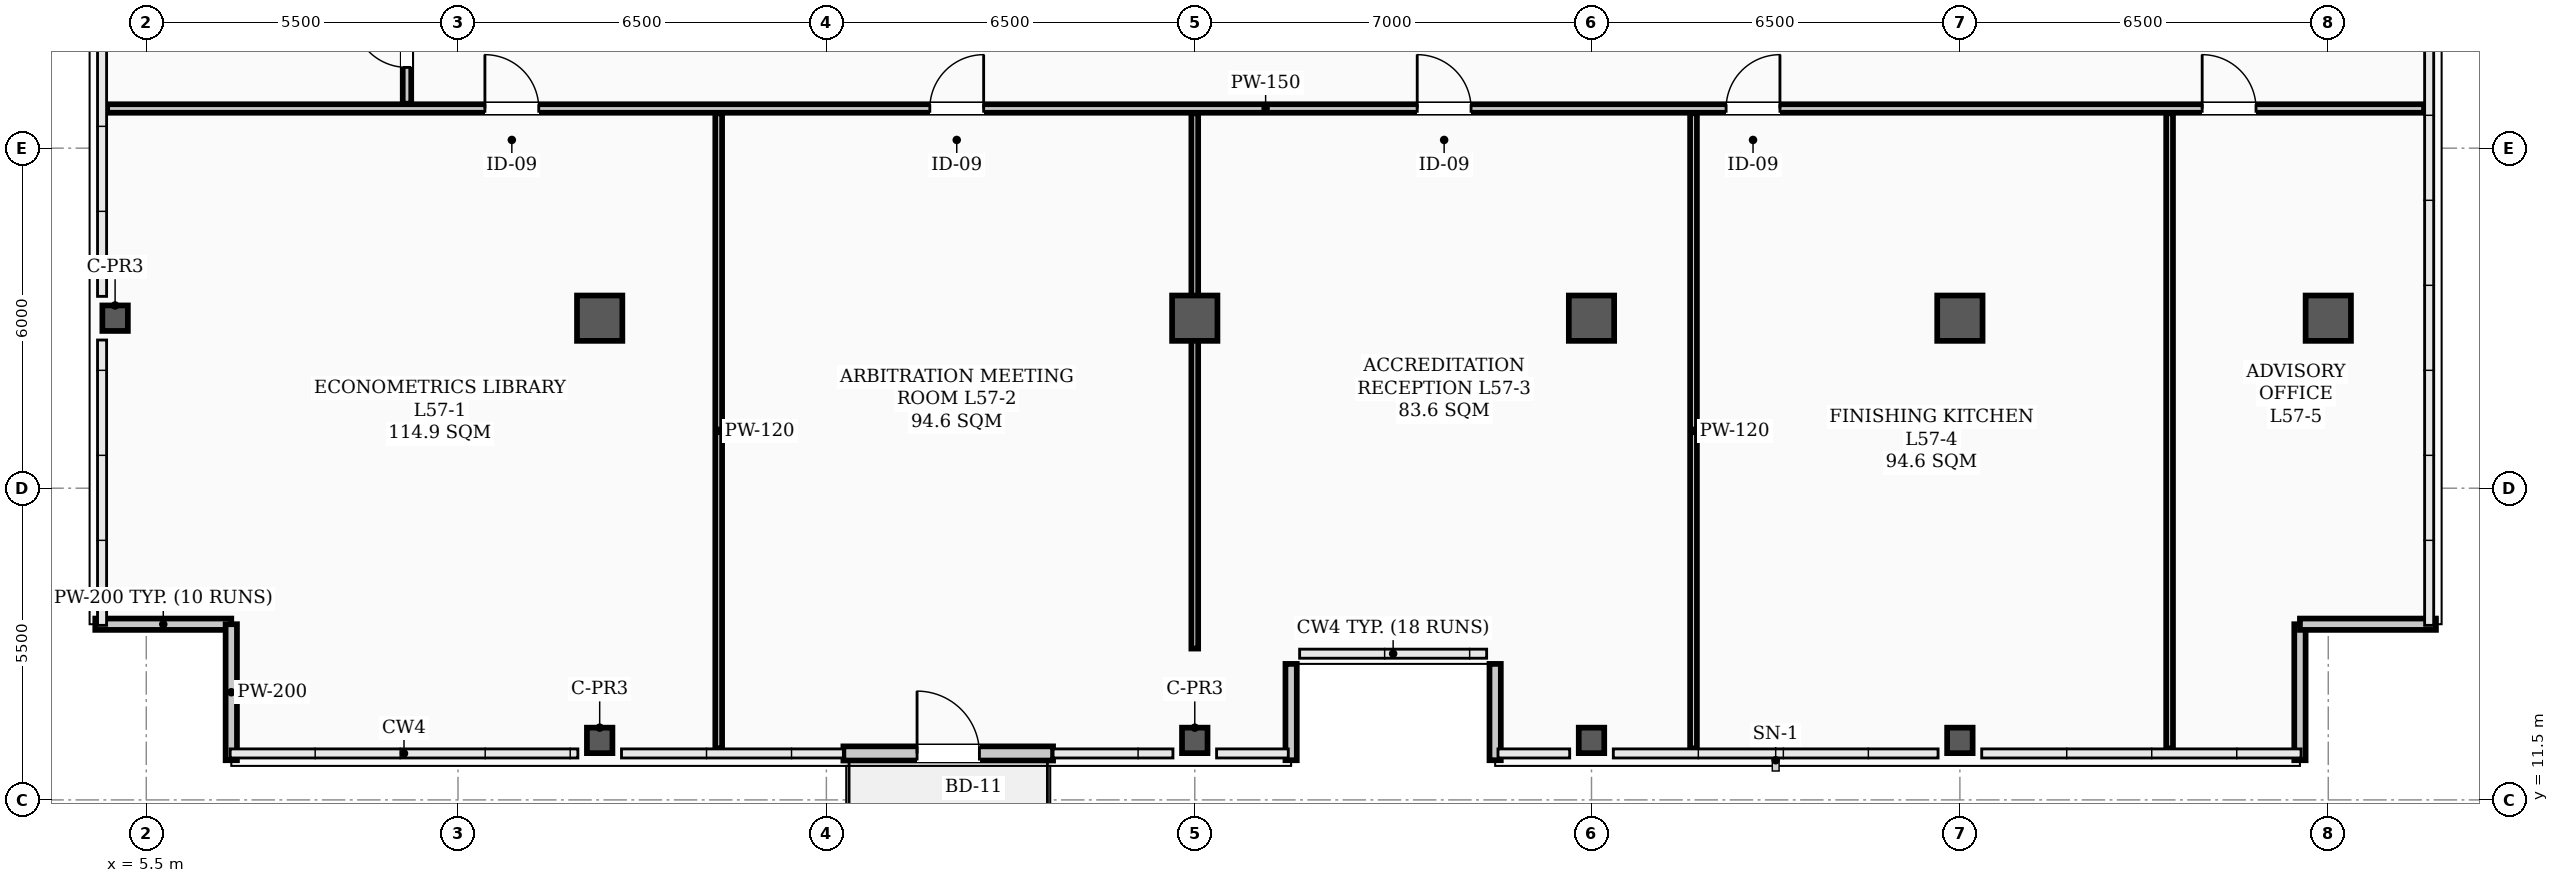
"""IFC4 building model, lengths in metres.
Left out: names, types, materials, properties, quantities, classifications, styles, units other than length and angle.
Written with IfcOpenShell. Run it as: python <this file> out.ifc"""

import sys

from ifc_helpers import new_model, si_unit, direction, frame, frame_2d, origin, origin_2d, place, context, subcontext, project, spatial, rectangle, hollow_rectangle, extrude, element, fill, save


model = new_model("IFC4")
c1 = context("Model", 3, precision=1e-05, world=origin(), true_north=direction((0.0, 1.0)))
c2 = subcontext(c1, "Body", "Model", "MODEL_VIEW")
j1 = project(units=[si_unit("LENGTHUNIT", "METRE"), si_unit("PLANEANGLEUNIT", "RADIAN")], contexts=[c1])
p1 = place(None, origin())
s1 = spatial("IfcSite", under=j1, at=p1, CompositionType="ELEMENT")
p2 = place(p1, origin())
s2 = spatial("IfcBuilding", under=s1, at=p2, CompositionType="ELEMENT")
p3 = place(p2, frame((0.0, 0.0, 230.6)))
s3 = spatial("IfcBuildingStorey", under=s2, at=p3, CompositionType="ELEMENT", Elevation=230.6)
for number, where, z_axis, x_axis in (
    (1, (13.5, 20.0, 0.0), (0.0, 0.0, 1.0), (1.0, 0.0, 0.0)),
    (2, (24.0, 20.0, 0.0), (0.0, 0.0, 1.0), (1.0, 0.0, 0.0)),
    (3, (31.0, 20.0, 0.0), (0.0, 0.0, 1.0), (1.0, 0.0, 0.0)),
    (4, (37.5, 20.0, 0.0), (0.0, 0.0, 1.0), (1.0, 0.0, 0.0)),
    (5, (44.0, 20.0, 0.0), (0.0, 0.0, 1.0), (1.0, 0.0, 0.0)),
):
    element("IfcColumn", number, at=place(p3, frame(where, z_axis=z_axis, x_axis=x_axis)), inside=s3, PredefinedType="COLUMN", context=c2, shape_type="SweptSolid", body=[
        extrude(hollow_rectangle(XDim=0.8, YDim=0.8, WallThickness=0.032, InnerFilletRadius=0.016, OuterFilletRadius=0.048, at=origin_2d()), origin(), (0.0, 0.0, 1.0), 3.9),
    ])
for number, where, z_axis, x_axis in (
    (6, (4.95, 20.0, 0.0), (0.0, 0.0, 1.0), (1.0, 0.0, 0.0)),
    (7, (13.5, 12.55, 0.0), (0.0, 0.0, 1.0), (1.0, 0.0, 0.0)),
    (8, (24.0, 12.55, 0.0), (0.0, 0.0, 1.0), (1.0, 0.0, 0.0)),
    (9, (31.0, 12.55, 0.0), (0.0, 0.0, 1.0), (1.0, 0.0, 0.0)),
    (10, (37.5, 12.55, 0.0), (0.0, 0.0, 1.0), (1.0, 0.0, 0.0)),
):
    element("IfcColumn", number, at=place(p3, frame(where, z_axis=z_axis, x_axis=x_axis)), inside=s3, PredefinedType="COLUMN", context=c2, shape_type="SweptSolid", body=[
        extrude(hollow_rectangle(XDim=0.45, YDim=0.45, WallThickness=0.022, InnerFilletRadius=0.022, OuterFilletRadius=0.044, at=origin_2d()), origin(), (0.0, 0.0, 1.0), 3.9),
    ])
p4 = place(p3, frame((4.6, 14.6, 0.0), z_axis=(0.0, 0.0, 1.0), x_axis=(1.0, 0.0, 0.0)))
e11 = element("IfcWall", 11, at=p4, inside=s3, PredefinedType="PARAPET", context=c2, shape_type="SweptSolid", body=[
    extrude(rectangle(XDim=2.4, YDim=0.2, at=frame_2d((1.2, 0.0))), origin(), (0.0, 0.0, 1.0), 1.2),
])
for number, where, z_axis, x_axis in (
    (12, (7.0, 14.6, 0.0), (0.0, 0.0, 1.0), (0.0, -1.0, 0.0)),
    (13, (43.5, 12.2, 0.0), (0.0, 0.0, 1.0), (0.0, 1.0, 0.0)),
):
    element("IfcWall", number, at=place(p3, frame(where, z_axis=z_axis, x_axis=x_axis)), inside=s3, PredefinedType="PARAPET", context=c2, shape_type="SweptSolid", body=[
        extrude(rectangle(XDim=2.4, YDim=0.2, at=frame_2d((1.2, 0.0))), origin(), (0.0, 0.0, 1.0), 1.2),
    ])
p5 = place(p3, frame((43.5, 14.6, 0.0), z_axis=(0.0, 0.0, 1.0), x_axis=(1.0, 0.0, 0.0)))
e14 = element("IfcWall", 14, at=p5, inside=s3, PredefinedType="PARAPET", context=c2, shape_type="SweptSolid", body=[
    extrude(rectangle(XDim=2.4, YDim=0.2, at=frame_2d((1.2, 0.0))), origin(), (0.0, 0.0, 1.0), 1.2),
])
for number, where, z_axis, x_axis in (
    (15, (25.7, 12.2, 0.0), (0.0, 0.0, 1.0), (0.0, 1.0, 0.0)),
    (16, (29.3, 13.9, 0.0), (0.0, 0.0, 1.0), (0.0, -1.0, 0.0)),
):
    element("IfcWall", number, at=place(p3, frame(where, z_axis=z_axis, x_axis=x_axis)), inside=s3, PredefinedType="PARAPET", context=c2, shape_type="SweptSolid", body=[
        extrude(rectangle(XDim=1.7, YDim=0.2, at=frame_2d((0.85, 0.0))), origin(), (0.0, 0.0, 1.0), 1.2),
    ])
p6 = place(p3, frame((17.8, 12.32, 0.0), z_axis=(0.0, 0.0, 1.0), x_axis=(1.0, 0.0, 0.0)))
e17 = element("IfcWall", 17, at=p6, inside=s3, PredefinedType="STANDARD", context=c2, shape_type="SweptSolid", body=[
    extrude(rectangle(XDim=3.7, YDim=0.25, at=frame_2d((1.85, 0.0))), origin(), (0.0, 0.0, 1.0), 3.18),
])
p7 = place(p6, frame((1.3, 0.0, 0.0)))
e18 = element("IfcOpeningElement", 18, at=p7, cuts=e17, PredefinedType="OPENING", context=c2, shape_type="SweptSolid", body=[
    extrude(rectangle(XDim=1.1, YDim=2.2, at=frame_2d((0.55, 1.1))), frame((0.0, 0.135, 0.0), z_axis=(0.0, -1.0, 0.0), x_axis=(1.0, 0.0, 0.0)), (0.0, 0.0, 1.0), 0.27),
])
p8 = place(p3, frame((4.81, 23.7, 0.0), z_axis=(0.0, 0.0, 1.0), x_axis=(1.0, 0.0, 0.0)))
e19 = element("IfcWall", 19, at=p8, inside=s3, PredefinedType="PARTITIONING", context=c2, shape_type="SweptSolid", body=[
    extrude(rectangle(XDim=40.88, YDim=0.15, at=frame_2d((20.44, 0.0))), origin(), (0.0, 0.0, 1.0), 3.2),
])
p9 = place(p8, frame((6.665, 0.0, 0.0)))
e20 = element("IfcOpeningElement", 20, at=p9, cuts=e19, PredefinedType="OPENING", context=c2, shape_type="SweptSolid", body=[
    extrude(rectangle(XDim=0.95, YDim=2.08, at=frame_2d((0.475, 1.04))), frame((0.0, 0.085, 0.0), z_axis=(0.0, -1.0, 0.0), x_axis=(1.0, 0.0, 0.0)), (0.0, 0.0, 1.0), 0.17),
])
p10 = place(p8, frame((14.515, 0.0, 0.0)))
e21 = element("IfcOpeningElement", 21, at=p10, cuts=e19, PredefinedType="OPENING", context=c2, shape_type="SweptSolid", body=[
    extrude(rectangle(XDim=0.95, YDim=2.08, at=frame_2d((0.475, 1.04))), frame((0.0, 0.085, 0.0), z_axis=(0.0, -1.0, 0.0), x_axis=(1.0, 0.0, 0.0)), (0.0, 0.0, 1.0), 0.17),
])
p11 = place(p8, frame((23.115, 0.0, 0.0)))
e22 = element("IfcOpeningElement", 22, at=p11, cuts=e19, PredefinedType="OPENING", context=c2, shape_type="SweptSolid", body=[
    extrude(rectangle(XDim=0.95, YDim=2.08, at=frame_2d((0.475, 1.04))), frame((0.0, 0.085, 0.0), z_axis=(0.0, -1.0, 0.0), x_axis=(1.0, 0.0, 0.0)), (0.0, 0.0, 1.0), 0.17),
])
p12 = place(p8, frame((28.565, 0.0, 0.0)))
e23 = element("IfcOpeningElement", 23, at=p12, cuts=e19, PredefinedType="OPENING", context=c2, shape_type="SweptSolid", body=[
    extrude(rectangle(XDim=0.95, YDim=2.08, at=frame_2d((0.475, 1.04))), frame((0.0, 0.085, 0.0), z_axis=(0.0, -1.0, 0.0), x_axis=(1.0, 0.0, 0.0)), (0.0, 0.0, 1.0), 0.17),
])
p13 = place(p8, frame((36.965, 0.0, 0.0)))
e24 = element("IfcOpeningElement", 24, at=p13, cuts=e19, PredefinedType="OPENING", context=c2, shape_type="SweptSolid", body=[
    extrude(rectangle(XDim=0.95, YDim=2.08, at=frame_2d((0.475, 1.04))), frame((0.0, 0.085, 0.0), z_axis=(0.0, -1.0, 0.0), x_axis=(1.0, 0.0, 0.0)), (0.0, 0.0, 1.0), 0.17),
])
p14 = place(p3, frame((10.1, 23.785, 0.0), z_axis=(0.0, 0.0, 1.0), x_axis=(0.0, 1.0, 0.0)))
e25 = element("IfcWall", 25, at=p14, inside=s3, PredefinedType="PARTITIONING", context=c2, shape_type="SweptSolid", body=[
    extrude(rectangle(XDim=12.28, YDim=0.15, at=frame_2d((6.14, 0.0))), origin(), (0.0, 0.0, 1.0), 3.1),
])
p15 = place(p14, frame((0.64, 0.0, 0.0)))
e26 = element("IfcOpeningElement", 26, at=p15, cuts=e25, PredefinedType="OPENING", context=c2, shape_type="SweptSolid", body=[
    extrude(rectangle(XDim=0.95, YDim=2.08, at=frame_2d((0.475, 1.04))), frame((0.0, 0.085, 0.0), z_axis=(0.0, -1.0, 0.0), x_axis=(1.0, 0.0, 0.0)), (0.0, 0.0, 1.0), 0.17),
])
p16 = place(p14, frame((9.815, 0.0, 0.0)))
e27 = element("IfcOpeningElement", 27, at=p16, cuts=e25, PredefinedType="OPENING", context=c2, shape_type="SweptSolid", body=[
    extrude(rectangle(XDim=0.95, YDim=2.08, at=frame_2d((0.475, 1.04))), frame((0.0, 0.085, 0.0), z_axis=(0.0, -1.0, 0.0), x_axis=(1.0, 0.0, 0.0)), (0.0, 0.0, 1.0), 0.17),
])
p17 = place(p3, frame((15.6, 12.41, 0.0), z_axis=(0.0, 0.0, 1.0), x_axis=(0.0, 1.0, 0.0)))
e28 = element("IfcWall", 28, at=p17, inside=s3, PredefinedType="PARTITIONING", context=c2, shape_type="SweptSolid", body=[
    extrude(rectangle(XDim=11.205, YDim=0.12, at=frame_2d((5.603, 0.0))), origin(), (0.0, 0.0, 1.0), 3.1),
])
p18 = place(p3, frame((24.0, 14.17, 0.0), z_axis=(0.0, 0.0, 1.0), x_axis=(0.0, 1.0, 0.0)))
e29 = element("IfcWall", 29, at=p18, inside=s3, PredefinedType="PARTITIONING", context=c2, shape_type="SweptSolid", body=[
    extrude(rectangle(XDim=9.445, YDim=0.12, at=frame_2d((4.723, 0.0))), origin(), (0.0, 0.0, 1.0), 3.1),
])
p19 = place(p3, frame((32.8, 12.41, 0.0), z_axis=(0.0, 0.0, 1.0), x_axis=(0.0, 1.0, 0.0)))
e30 = element("IfcWall", 30, at=p19, inside=s3, PredefinedType="PARTITIONING", context=c2, shape_type="SweptSolid", body=[
    extrude(rectangle(XDim=11.205, YDim=0.12, at=frame_2d((5.603, 0.0))), origin(), (0.0, 0.0, 1.0), 3.1),
])
p20 = place(p3, frame((41.2, 12.41, 0.0), z_axis=(0.0, 0.0, 1.0), x_axis=(0.0, 1.0, 0.0)))
e31 = element("IfcWall", 31, at=p20, inside=s3, PredefinedType="PARTITIONING", context=c2, shape_type="SweptSolid", body=[
    extrude(rectangle(XDim=11.205, YDim=0.12, at=frame_2d((5.603, 0.0))), origin(), (0.0, 0.0, 1.0), 3.72),
])
p21 = place(p7, origin())
e32 = element("IfcDoor", 32, at=p21, inside=s3, OperationType="SINGLE_SWING_LEFT", PredefinedType="DOOR", context=c2, shape_type="SweptSolid", body=[
    extrude(rectangle(XDim=1.1, YDim=2.2, at=frame_2d((0.55, 1.1))), frame((0.0, 0.025, 0.0), z_axis=(0.0, -1.0, 0.0), x_axis=(1.0, 0.0, 0.0)), (0.0, 0.0, 1.0), 0.05),
])
fill(e18, e32)
p22 = place(p9, origin())
e33 = element("IfcDoor", 33, at=p22, inside=s3, OperationType="SINGLE_SWING_LEFT", PredefinedType="DOOR", context=c2, shape_type="SweptSolid", body=[
    extrude(rectangle(XDim=0.95, YDim=2.08, at=frame_2d((0.475, 1.04))), frame((0.0, 0.025, 0.0), z_axis=(0.0, -1.0, 0.0), x_axis=(1.0, 0.0, 0.0)), (0.0, 0.0, 1.0), 0.05),
])
fill(e20, e33)
p23 = place(p10, origin())
e34 = element("IfcDoor", 34, at=p23, inside=s3, OperationType="SINGLE_SWING_RIGHT", PredefinedType="DOOR", context=c2, shape_type="SweptSolid", body=[
    extrude(rectangle(XDim=0.95, YDim=2.08, at=frame_2d((0.475, 1.04))), frame((0.0, 0.025, 0.0), z_axis=(0.0, -1.0, 0.0), x_axis=(1.0, 0.0, 0.0)), (0.0, 0.0, 1.0), 0.05),
])
fill(e21, e34)
p24 = place(p11, origin())
e35 = element("IfcDoor", 35, at=p24, inside=s3, OperationType="SINGLE_SWING_LEFT", PredefinedType="DOOR", context=c2, shape_type="SweptSolid", body=[
    extrude(rectangle(XDim=0.95, YDim=2.08, at=frame_2d((0.475, 1.04))), frame((0.0, 0.025, 0.0), z_axis=(0.0, -1.0, 0.0), x_axis=(1.0, 0.0, 0.0)), (0.0, 0.0, 1.0), 0.05),
])
fill(e22, e35)
p25 = place(p12, origin())
e36 = element("IfcDoor", 36, at=p25, inside=s3, OperationType="SINGLE_SWING_RIGHT", PredefinedType="DOOR", context=c2, shape_type="SweptSolid", body=[
    extrude(rectangle(XDim=0.95, YDim=2.08, at=frame_2d((0.475, 1.04))), frame((0.0, 0.025, 0.0), z_axis=(0.0, -1.0, 0.0), x_axis=(1.0, 0.0, 0.0)), (0.0, 0.0, 1.0), 0.05),
])
fill(e23, e36)
p26 = place(p13, origin())
e37 = element("IfcDoor", 37, at=p26, inside=s3, OperationType="SINGLE_SWING_LEFT", PredefinedType="DOOR", context=c2, shape_type="SweptSolid", body=[
    extrude(rectangle(XDim=0.95, YDim=2.08, at=frame_2d((0.475, 1.04))), frame((0.0, 0.025, 0.0), z_axis=(0.0, -1.0, 0.0), x_axis=(1.0, 0.0, 0.0)), (0.0, 0.0, 1.0), 0.05),
])
fill(e24, e37)
p27 = place(p15, origin())
e38 = element("IfcDoor", 38, at=p27, inside=s3, OperationType="SINGLE_SWING_RIGHT", PredefinedType="DOOR", context=c2, shape_type="SweptSolid", body=[
    extrude(rectangle(XDim=0.95, YDim=2.08, at=frame_2d((0.475, 1.04))), frame((0.0, 0.025, 0.0), z_axis=(0.0, -1.0, 0.0), x_axis=(1.0, 0.0, 0.0)), (0.0, 0.0, 1.0), 0.05),
])
fill(e26, e38)
save(model, sys.argv[1])
